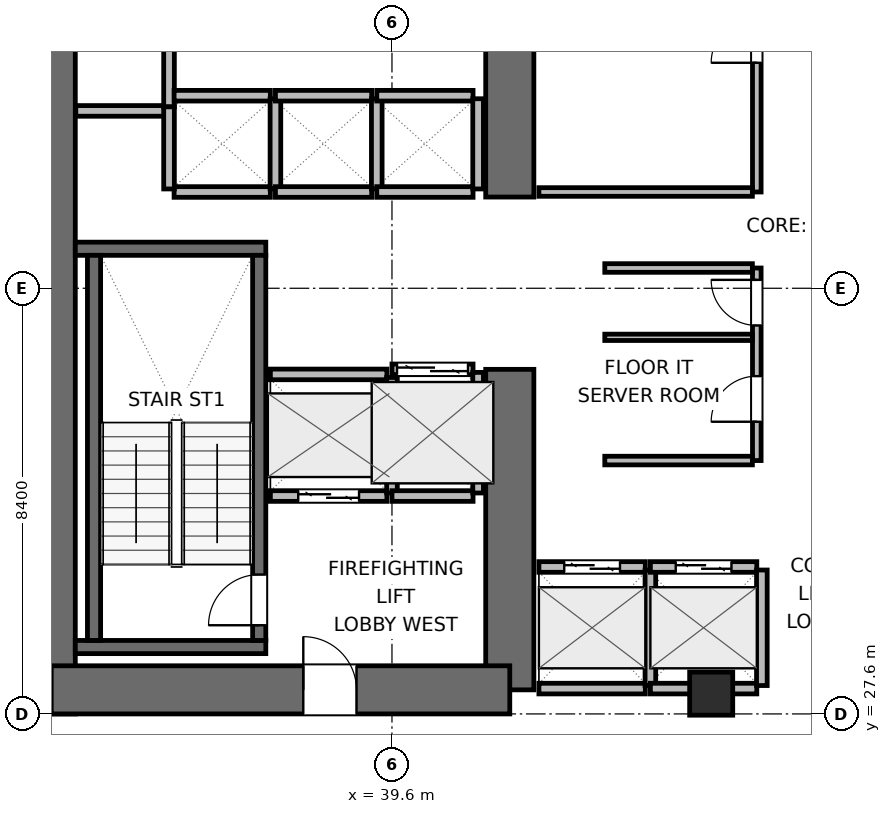
"""IFC4 building model, lengths in metres.
Left out: names, types, materials, properties, quantities, classifications, styles, units other than length and angle.
Written with IfcOpenShell. Run it as: python <this file> out.ifc"""

import sys

from ifc_helpers import new_model, si_unit, direction, frame, frame_2d, origin, origin_2d, place, context, subcontext, project, spatial, rectangle, extrude, element, fill, save


model = new_model("IFC4")
c1 = context("Model", 3, precision=1e-05, world=origin(), true_north=direction((0.0, 1.0)))
c2 = subcontext(c1, "Body", "Model", "MODEL_VIEW")
j1 = project(units=[si_unit("LENGTHUNIT", "METRE"), si_unit("PLANEANGLEUNIT", "RADIAN")], contexts=[c1])
p1 = place(None, origin())
s1 = spatial("IfcSite", under=j1, at=p1, CompositionType="ELEMENT")
p2 = place(p1, origin())
s2 = spatial("IfcBuilding", under=s1, at=p2, CompositionType="ELEMENT")
p3 = place(p2, frame((0.0, 0.0, 76.8)))
s3 = spatial("IfcBuildingStorey", under=s2, at=p3, CompositionType="ELEMENT", Elevation=76.8)
p4 = place(p3, frame((32.875, 27.6, 0.0), z_axis=(0.0, 0.0, 1.0), x_axis=(0.0, 1.0, 0.0)))
e1 = element("IfcWall", 1, at=p4, inside=s3, PredefinedType="SHEAR", context=c2, shape_type="SweptSolid", body=[
    extrude(rectangle(XDim=16.8, YDim=0.95, at=frame_2d((8.4, 0.0))), origin(), (0.0, 0.0, 1.0), 3.9),
])
p5 = place(p3, frame((41.925, 28.075, 0.0), z_axis=(0.0, 0.0, 1.0), x_axis=(0.0, 1.0, 0.0)))
e2 = element("IfcWall", 2, at=p5, inside=s3, PredefinedType="SHEAR", context=c2, shape_type="SweptSolid", body=[
    extrude(rectangle(XDim=6.325, YDim=0.95, at=frame_2d((3.163, 0.0))), origin(), (0.0, 0.0, 1.0), 3.9),
])
p6 = place(p3, frame((41.925, 37.8, 0.0), z_axis=(0.0, 0.0, 1.0), x_axis=(0.0, 1.0, 0.0)))
e3 = element("IfcWall", 3, at=p6, inside=s3, PredefinedType="SHEAR", context=c2, shape_type="SweptSolid", body=[
    extrude(rectangle(XDim=6.125, YDim=0.95, at=frame_2d((3.062, 0.0))), origin(), (0.0, 0.0, 1.0), 3.9),
])
p7 = place(p3, frame((32.875, 28.075, 0.0), z_axis=(0.0, 0.0, 1.0), x_axis=(1.0, 0.0, 0.0)))
e4 = element("IfcWall", 4, at=p7, inside=s3, PredefinedType="SHEAR", context=c2, shape_type="SweptSolid", body=[
    extrude(rectangle(XDim=9.05, YDim=0.95, at=frame_2d((4.525, 0.0))), origin(), (0.0, 0.0, 1.0), 3.9),
])
p8 = place(p7, frame((4.975, 0.0, 0.0)))
e5 = element("IfcOpeningElement", 5, at=p8, cuts=e4, PredefinedType="OPENING", context=c2, shape_type="SweptSolid", body=[
    extrude(rectangle(XDim=1.05, YDim=2.04, at=frame_2d((0.525, 1.02))), frame((0.0, 0.485, 0.0), z_axis=(0.0, -1.0, 0.0), x_axis=(1.0, 0.0, 0.0)), (0.0, 0.0, 1.0), 0.97),
])
for number, where, z_axis, x_axis in (
    (6, (33.35, 28.92, 0.0), (0.0, 0.0, 1.0), (1.0, 0.0, 0.0)),
    (7, (33.35, 36.78, 0.0), (0.0, 0.0, 1.0), (1.0, 0.0, 0.0)),
):
    element("IfcWall", number, at=place(p3, frame(where, z_axis=z_axis, x_axis=x_axis)), inside=s3, PredefinedType="SHEAR", context=c2, shape_type="SweptSolid", body=[
        extrude(rectangle(XDim=3.76, YDim=0.26, at=frame_2d((1.88, 0.0))), origin(), (0.0, 0.0, 1.0), 3.9),
    ])
p9 = place(p3, frame((33.72, 29.05, 0.0), z_axis=(0.0, 0.0, 1.0), x_axis=(0.0, 1.0, 0.0)))
e8 = element("IfcWall", 8, at=p9, inside=s3, PredefinedType="SHEAR", context=c2, shape_type="SweptSolid", body=[
    extrude(rectangle(XDim=7.6, YDim=0.26, at=frame_2d((3.8, 0.0))), origin(), (0.0, 0.0, 1.0), 3.9),
])
p10 = place(p3, frame((36.98, 29.05, 0.0), z_axis=(0.0, 0.0, 1.0), x_axis=(0.0, 1.0, 0.0)))
e9 = element("IfcWall", 9, at=p10, inside=s3, PredefinedType="SHEAR", context=c2, shape_type="SweptSolid", body=[
    extrude(rectangle(XDim=7.6, YDim=0.26, at=frame_2d((3.8, 0.0))), origin(), (0.0, 0.0, 1.0), 3.9),
])
p11 = place(p10, frame((0.3, 0.0, 0.0)))
e10 = element("IfcOpeningElement", 10, at=p11, cuts=e9, PredefinedType="OPENING", context=c2, shape_type="SweptSolid", body=[
    extrude(rectangle(XDim=1.0, YDim=2.04, at=frame_2d((0.5, 1.02))), frame((0.0, 0.14, 0.0), z_axis=(0.0, -1.0, 0.0), x_axis=(1.0, 0.0, 0.0)), (0.0, 0.0, 1.0), 0.28),
])
p12 = place(p3, frame((45.9, 28.0, 0.0), z_axis=(0.0, 0.0, 1.0), x_axis=(1.0, 0.0, 0.0)))
e11 = element("IfcColumn", 11, at=p12, inside=s3, PredefinedType="COLUMN", context=c2, shape_type="SweptSolid", body=[
    extrude(rectangle(XDim=0.85, YDim=0.85, at=origin_2d()), origin(), (0.0, 0.0, 1.0), 3.9),
])
p13 = place(p3, frame((33.36, 39.5, 0.0), z_axis=(0.0, 0.0, 1.0), x_axis=(1.0, 0.0, 0.0)))
e12 = element("IfcWall", 12, at=p13, inside=s3, PredefinedType="PARTITIONING", context=c2, shape_type="SweptSolid", body=[
    extrude(rectangle(XDim=1.86, YDim=0.21, at=frame_2d((0.93, 0.0))), origin(), (0.0, 0.0, 1.0), 3.6),
])
p14 = place(p3, frame((35.2, 39.58, 0.0), z_axis=(0.0, 0.0, 1.0), x_axis=(0.0, 1.0, 0.0)))
e13 = element("IfcWall", 13, at=p14, inside=s3, PredefinedType="PARTITIONING", context=c2, shape_type="SweptSolid", body=[
    extrude(rectangle(XDim=1.32, YDim=0.21, at=frame_2d((0.66, 0.0))), origin(), (0.0, 0.0, 1.0), 3.6),
])
p15 = place(p3, frame((37.2, 31.9, 0.0), z_axis=(0.0, 0.0, 1.0), x_axis=(1.0, 0.0, 0.0)))
e14 = element("IfcWall", 14, at=p15, inside=s3, PredefinedType="PARTITIONING", context=c2, shape_type="SweptSolid", body=[
    extrude(rectangle(XDim=2.3, YDim=0.21, at=frame_2d((1.15, 0.0))), origin(), (0.0, 0.0, 1.0), 3.6),
])
p16 = place(p15, frame((0.55, 0.0, 0.0)))
e15 = element("IfcOpeningElement", 15, at=p16, cuts=e14, PredefinedType="OPENING", context=c2, shape_type="SweptSolid", body=[
    extrude(rectangle(XDim=1.2, YDim=2.04, at=frame_2d((0.6, 1.02))), frame((0.0, 0.115, 0.0), z_axis=(0.0, -1.0, 0.0), x_axis=(1.0, 0.0, 0.0)), (0.0, 0.0, 1.0), 0.23),
])
p17 = place(p3, frame((37.2, 34.3, 0.0), z_axis=(0.0, 0.0, 1.0), x_axis=(1.0, 0.0, 0.0)))
e16 = element("IfcWall", 16, at=p17, inside=s3, PredefinedType="PARTITIONING", context=c2, shape_type="SweptSolid", body=[
    extrude(rectangle(XDim=2.3, YDim=0.21, at=frame_2d((1.15, 0.0))), origin(), (0.0, 0.0, 1.0), 3.6),
])
p18 = place(p3, frame((39.6, 31.96, 0.0), z_axis=(0.0, 0.0, 1.0), x_axis=(0.0, 1.0, 0.0)))
e17 = element("IfcWall", 17, at=p18, inside=s3, PredefinedType="PARTITIONING", context=c2, shape_type="SweptSolid", body=[
    extrude(rectangle(XDim=2.28, YDim=0.21, at=frame_2d((1.14, 0.0))), origin(), (0.0, 0.0, 1.0), 3.6),
])
p19 = place(p3, frame((39.6, 34.4, 0.0), z_axis=(0.0, 0.0, 1.0), x_axis=(1.0, 0.0, 0.0)))
e18 = element("IfcWall", 18, at=p19, inside=s3, PredefinedType="PARTITIONING", context=c2, shape_type="SweptSolid", body=[
    extrude(rectangle(XDim=1.6, YDim=0.21, at=frame_2d((0.8, 0.0))), origin(), (0.0, 0.0, 1.0), 3.6),
])
p20 = place(p19, frame((0.1, 0.0, 0.0)))
e19 = element("IfcOpeningElement", 19, at=p20, cuts=e18, PredefinedType="OPENING", context=c2, shape_type="SweptSolid", body=[
    extrude(rectangle(XDim=1.4, YDim=2.06, at=frame_2d((0.7, 1.03))), frame((0.0, 0.115, 0.0), z_axis=(0.0, -1.0, 0.0), x_axis=(1.0, 0.0, 0.0)), (0.0, 0.0, 1.0), 0.23),
])
p21 = place(p3, frame((39.6, 31.9, 0.0), z_axis=(0.0, 0.0, 1.0), x_axis=(1.0, 0.0, 0.0)))
e20 = element("IfcWall", 20, at=p21, inside=s3, PredefinedType="PARTITIONING", context=c2, shape_type="SweptSolid", body=[
    extrude(rectangle(XDim=1.6, YDim=0.21, at=frame_2d((0.8, 0.0))), origin(), (0.0, 0.0, 1.0), 3.6),
])
p22 = place(p3, frame((41.3, 31.96, 0.0), z_axis=(0.0, 0.0, 1.0), x_axis=(0.0, 1.0, 0.0)))
e21 = element("IfcWall", 21, at=p22, inside=s3, PredefinedType="PARTITIONING", context=c2, shape_type="SweptSolid", body=[
    extrude(rectangle(XDim=2.38, YDim=0.21, at=frame_2d((1.19, 0.0))), origin(), (0.0, 0.0, 1.0), 3.6),
])
p23 = place(p3, frame((42.5, 30.5, 0.0), z_axis=(0.0, 0.0, 1.0), x_axis=(1.0, 0.0, 0.0)))
e22 = element("IfcWall", 22, at=p23, inside=s3, PredefinedType="PARTITIONING", context=c2, shape_type="SweptSolid", body=[
    extrude(rectangle(XDim=2.1, YDim=0.21, at=frame_2d((1.05, 0.0))), origin(), (0.0, 0.0, 1.0), 3.6),
])
p24 = place(p23, frame((0.5, 0.0, 0.0)))
e23 = element("IfcOpeningElement", 23, at=p24, cuts=e22, PredefinedType="OPENING", context=c2, shape_type="SweptSolid", body=[
    extrude(rectangle(XDim=1.1, YDim=2.04, at=frame_2d((0.55, 1.02))), frame((0.0, 0.115, 0.0), z_axis=(0.0, -1.0, 0.0), x_axis=(1.0, 0.0, 0.0)), (0.0, 0.0, 1.0), 0.23),
])
p25 = place(p3, frame((42.5, 28.1, 0.0), z_axis=(0.0, 0.0, 1.0), x_axis=(1.0, 0.0, 0.0)))
e24 = element("IfcWall", 24, at=p25, inside=s3, PredefinedType="PARTITIONING", context=c2, shape_type="SweptSolid", body=[
    extrude(rectangle(XDim=2.1, YDim=0.21, at=frame_2d((1.05, 0.0))), origin(), (0.0, 0.0, 1.0), 2.485),
])
p26 = place(p3, frame((44.7, 28.16, 0.0), z_axis=(0.0, 0.0, 1.0), x_axis=(0.0, 1.0, 0.0)))
e25 = element("IfcWall", 25, at=p26, inside=s3, PredefinedType="PARTITIONING", context=c2, shape_type="SweptSolid", body=[
    extrude(rectangle(XDim=2.28, YDim=0.21, at=frame_2d((1.14, 0.0))), origin(), (0.0, 0.0, 1.0), 3.6),
])
p27 = place(p3, frame((44.7, 30.5, 0.0), z_axis=(0.0, 0.0, 1.0), x_axis=(1.0, 0.0, 0.0)))
e26 = element("IfcWall", 26, at=p27, inside=s3, PredefinedType="PARTITIONING", context=c2, shape_type="SweptSolid", body=[
    extrude(rectangle(XDim=2.1, YDim=0.21, at=frame_2d((1.05, 0.0))), origin(), (0.0, 0.0, 1.0), 3.6),
])
p28 = place(p27, frame((0.5, 0.0, 0.0)))
e27 = element("IfcOpeningElement", 27, at=p28, cuts=e26, PredefinedType="OPENING", context=c2, shape_type="SweptSolid", body=[
    extrude(rectangle(XDim=1.1, YDim=2.04, at=frame_2d((0.55, 1.02))), frame((0.0, 0.115, 0.0), z_axis=(0.0, -1.0, 0.0), x_axis=(1.0, 0.0, 0.0)), (0.0, 0.0, 1.0), 0.23),
])
p29 = place(p3, frame((44.7, 28.1, 0.0), z_axis=(0.0, 0.0, 1.0), x_axis=(1.0, 0.0, 0.0)))
e28 = element("IfcWall", 28, at=p29, inside=s3, PredefinedType="PARTITIONING", context=c2, shape_type="SweptSolid", body=[
    extrude(rectangle(XDim=2.1, YDim=0.21, at=frame_2d((1.05, 0.0))), origin(), (0.0, 0.0, 1.0), 2.485),
])
p30 = place(p3, frame((46.9, 28.16, 0.0), z_axis=(0.0, 0.0, 1.0), x_axis=(0.0, 1.0, 0.0)))
e29 = element("IfcWall", 29, at=p30, inside=s3, PredefinedType="PARTITIONING", context=c2, shape_type="SweptSolid", body=[
    extrude(rectangle(XDim=2.28, YDim=0.21, at=frame_2d((1.14, 0.0))), origin(), (0.0, 0.0, 1.0), 3.6),
])
for number, where, z_axis, x_axis in (
    (30, (35.3, 37.9, 0.0), (0.0, 0.0, 1.0), (1.0, 0.0, 0.0)),
    (31, (35.3, 39.8, 0.0), (0.0, 0.0, 1.0), (1.0, 0.0, 0.0)),
):
    element("IfcWall", number, at=place(p3, frame(where, z_axis=z_axis, x_axis=x_axis)), inside=s3, PredefinedType="PARTITIONING", context=c2, shape_type="SweptSolid", body=[
        extrude(rectangle(XDim=1.9, YDim=0.21, at=frame_2d((0.95, 0.0))), origin(), (0.0, 0.0, 1.0), 3.6),
    ])
p31 = place(p3, frame((35.2, 37.96, 0.0), z_axis=(0.0, 0.0, 1.0), x_axis=(0.0, 1.0, 0.0)))
e32 = element("IfcWall", 32, at=p31, inside=s3, PredefinedType="PARTITIONING", context=c2, shape_type="SweptSolid", body=[
    extrude(rectangle(XDim=1.62, YDim=0.21, at=frame_2d((0.81, 0.0))), origin(), (0.0, 0.0, 1.0), 3.6),
])
p32 = place(p3, frame((37.3, 37.96, 0.0), z_axis=(0.0, 0.0, 1.0), x_axis=(0.0, 1.0, 0.0)))
e33 = element("IfcWall", 33, at=p32, inside=s3, PredefinedType="PARTITIONING", context=c2, shape_type="SweptSolid", body=[
    extrude(rectangle(XDim=1.78, YDim=0.21, at=frame_2d((0.89, 0.0))), origin(), (0.0, 0.0, 1.0), 3.6),
])
for number, where, z_axis, x_axis in (
    (34, (37.3, 37.9, 0.0), (0.0, 0.0, 1.0), (1.0, 0.0, 0.0)),
    (35, (37.3, 39.8, 0.0), (0.0, 0.0, 1.0), (1.0, 0.0, 0.0)),
):
    element("IfcWall", number, at=place(p3, frame(where, z_axis=z_axis, x_axis=x_axis)), inside=s3, PredefinedType="PARTITIONING", context=c2, shape_type="SweptSolid", body=[
        extrude(rectangle(XDim=1.9, YDim=0.21, at=frame_2d((0.95, 0.0))), origin(), (0.0, 0.0, 1.0), 3.6),
    ])
p33 = place(p3, frame((39.3, 37.96, 0.0), z_axis=(0.0, 0.0, 1.0), x_axis=(0.0, 1.0, 0.0)))
e36 = element("IfcWall", 36, at=p33, inside=s3, PredefinedType="PARTITIONING", context=c2, shape_type="SweptSolid", body=[
    extrude(rectangle(XDim=1.78, YDim=0.21, at=frame_2d((0.89, 0.0))), origin(), (0.0, 0.0, 1.0), 3.6),
])
for number, where, z_axis, x_axis in (
    (37, (39.3, 37.9, 0.0), (0.0, 0.0, 1.0), (1.0, 0.0, 0.0)),
    (38, (39.3, 39.8, 0.0), (0.0, 0.0, 1.0), (1.0, 0.0, 0.0)),
):
    element("IfcWall", number, at=place(p3, frame(where, z_axis=z_axis, x_axis=x_axis)), inside=s3, PredefinedType="PARTITIONING", context=c2, shape_type="SweptSolid", body=[
        extrude(rectangle(XDim=1.9, YDim=0.21, at=frame_2d((0.95, 0.0))), origin(), (0.0, 0.0, 1.0), 3.6),
    ])
p34 = place(p3, frame((41.3, 37.96, 0.0), z_axis=(0.0, 0.0, 1.0), x_axis=(0.0, 1.0, 0.0)))
e39 = element("IfcWall", 39, at=p34, inside=s3, PredefinedType="PARTITIONING", context=c2, shape_type="SweptSolid", body=[
    extrude(rectangle(XDim=1.78, YDim=0.21, at=frame_2d((0.89, 0.0))), origin(), (0.0, 0.0, 1.0), 3.6),
])
p35 = place(p3, frame((46.8, 32.6, 0.0), z_axis=(0.0, 0.0, 1.0), x_axis=(0.0, 1.0, 0.0)))
e40 = element("IfcWall", 40, at=p35, inside=s3, PredefinedType="PARTITIONING", context=c2, shape_type="SweptSolid", body=[
    extrude(rectangle(XDim=3.8, YDim=0.17, at=frame_2d((1.9, 0.0))), origin(), (0.0, 0.0, 1.0), 3.6),
])
p36 = place(p35, frame((0.766, 0.0, 0.0)))
e41 = element("IfcOpeningElement", 41, at=p36, cuts=e40, PredefinedType="OPENING", context=c2, shape_type="SweptSolid", body=[
    extrude(rectangle(XDim=0.9, YDim=2.02, at=frame_2d((0.45, 1.01))), frame((0.0, 0.095, 0.0), z_axis=(0.0, -1.0, 0.0), x_axis=(1.0, 0.0, 0.0)), (0.0, 0.0, 1.0), 0.19),
])
p37 = place(p35, frame((2.666, 0.0, 0.0)))
e42 = element("IfcOpeningElement", 42, at=p37, cuts=e40, PredefinedType="OPENING", context=c2, shape_type="SweptSolid", body=[
    extrude(rectangle(XDim=0.9, YDim=2.02, at=frame_2d((0.45, 1.01))), frame((0.0, 0.095, 0.0), z_axis=(0.0, -1.0, 0.0), x_axis=(1.0, 0.0, 0.0)), (0.0, 0.0, 1.0), 0.19),
])
for number, where, z_axis, x_axis in (
    (43, (43.8, 32.6, 0.0), (0.0, 0.0, 1.0), (1.0, 0.0, 0.0)),
    (44, (43.8, 36.4, 0.0), (0.0, 0.0, 1.0), (1.0, 0.0, 0.0)),
):
    element("IfcWall", number, at=place(p3, frame(where, z_axis=z_axis, x_axis=x_axis)), inside=s3, PredefinedType="PARTITIONING", context=c2, shape_type="SweptSolid", body=[
        extrude(rectangle(XDim=2.913, YDim=0.17, at=frame_2d((1.457, 0.0))), origin(), (0.0, 0.0, 1.0), 3.6),
    ])
p38 = place(p3, frame((43.8, 35.032, 0.0), z_axis=(0.0, 0.0, 1.0), x_axis=(1.0, 0.0, 0.0)))
e45 = element("IfcWall", 45, at=p38, inside=s3, PredefinedType="PARTITIONING", context=c2, shape_type="SweptSolid", body=[
    extrude(rectangle(XDim=2.913, YDim=0.125, at=frame_2d((1.457, 0.0))), origin(), (0.0, 0.0, 1.0), 3.6),
])
p39 = place(p3, frame((46.8, 37.9, 0.0), z_axis=(0.0, 0.0, 1.0), x_axis=(0.0, 1.0, 0.0)))
e46 = element("IfcWall", 46, at=p39, inside=s3, PredefinedType="PARTITIONING", context=c2, shape_type="SweptSolid", body=[
    extrude(rectangle(XDim=6.0, YDim=0.17, at=frame_2d((3.0, 0.0))), origin(), (0.0, 0.0, 1.0), 3.6),
])
p40 = place(p39, frame((2.55, 0.0, 0.0)))
e47 = element("IfcOpeningElement", 47, at=p40, cuts=e46, PredefinedType="OPENING", context=c2, shape_type="SweptSolid", body=[
    extrude(rectangle(XDim=0.9, YDim=2.02, at=frame_2d((0.45, 1.01))), frame((0.0, 0.095, 0.0), z_axis=(0.0, -1.0, 0.0), x_axis=(1.0, 0.0, 0.0)), (0.0, 0.0, 1.0), 0.19),
])
p41 = place(p3, frame((42.5, 37.9, 0.0), z_axis=(0.0, 0.0, 1.0), x_axis=(1.0, 0.0, 0.0)))
e48 = element("IfcWall", 48, at=p41, inside=s3, PredefinedType="PARTITIONING", context=c2, shape_type="SweptSolid", body=[
    extrude(rectangle(XDim=4.213, YDim=0.17, at=frame_2d((2.106, 0.0))), origin(), (0.0, 0.0, 1.0), 3.6),
])
p42 = place(p11, origin())
e49 = element("IfcDoor", 49, at=p42, inside=s3, OperationType="SINGLE_SWING_LEFT", PredefinedType="DOOR", context=c2, shape_type="SweptSolid", body=[
    extrude(rectangle(XDim=1.0, YDim=2.04, at=frame_2d((0.5, 1.02))), frame((0.0, 0.025, 0.0), z_axis=(0.0, -1.0, 0.0), x_axis=(1.0, 0.0, 0.0)), (0.0, 0.0, 1.0), 0.05),
])
fill(e10, e49)
p43 = place(p16, origin())
e50 = element("IfcDoor", 50, at=p43, inside=s3, OperationType="DOUBLE_DOOR_SLIDING", PredefinedType="DOOR", context=c2, shape_type="SweptSolid", body=[
    extrude(rectangle(XDim=1.2, YDim=2.04, at=frame_2d((0.6, 1.02))), frame((0.0, 0.025, 0.0), z_axis=(0.0, -1.0, 0.0), x_axis=(1.0, 0.0, 0.0)), (0.0, 0.0, 1.0), 0.05),
])
fill(e15, e50)
p44 = place(p20, origin())
e51 = element("IfcDoor", 51, at=p44, inside=s3, OperationType="DOUBLE_DOOR_SLIDING", PredefinedType="DOOR", context=c2, shape_type="SweptSolid", body=[
    extrude(rectangle(XDim=1.4, YDim=2.06, at=frame_2d((0.7, 1.03))), frame((0.0, 0.025, 0.0), z_axis=(0.0, -1.0, 0.0), x_axis=(1.0, 0.0, 0.0)), (0.0, 0.0, 1.0), 0.05),
])
fill(e19, e51)
p45 = place(p24, origin())
e52 = element("IfcDoor", 52, at=p45, inside=s3, OperationType="DOUBLE_DOOR_SLIDING", PredefinedType="DOOR", context=c2, shape_type="SweptSolid", body=[
    extrude(rectangle(XDim=1.1, YDim=2.04, at=frame_2d((0.55, 1.02))), frame((0.0, 0.025, 0.0), z_axis=(0.0, -1.0, 0.0), x_axis=(1.0, 0.0, 0.0)), (0.0, 0.0, 1.0), 0.05),
])
fill(e23, e52)
p46 = place(p28, origin())
e53 = element("IfcDoor", 53, at=p46, inside=s3, OperationType="DOUBLE_DOOR_SLIDING", PredefinedType="DOOR", context=c2, shape_type="SweptSolid", body=[
    extrude(rectangle(XDim=1.1, YDim=2.04, at=frame_2d((0.55, 1.02))), frame((0.0, 0.025, 0.0), z_axis=(0.0, -1.0, 0.0), x_axis=(1.0, 0.0, 0.0)), (0.0, 0.0, 1.0), 0.05),
])
fill(e27, e53)
p47 = place(p8, origin())
e54 = element("IfcDoor", 54, at=p47, inside=s3, OperationType="SINGLE_SWING_LEFT", PredefinedType="DOOR", context=c2, shape_type="SweptSolid", body=[
    extrude(rectangle(XDim=1.05, YDim=2.04, at=frame_2d((0.525, 1.02))), frame((0.0, 0.025, 0.0), z_axis=(0.0, -1.0, 0.0), x_axis=(1.0, 0.0, 0.0)), (0.0, 0.0, 1.0), 0.05),
])
fill(e5, e54)
p48 = place(p36, origin())
e55 = element("IfcDoor", 55, at=p48, inside=s3, OperationType="SINGLE_SWING_LEFT", PredefinedType="DOOR", context=c2, shape_type="SweptSolid", body=[
    extrude(rectangle(XDim=0.9, YDim=2.02, at=frame_2d((0.45, 1.01))), frame((0.0, 0.025, 0.0), z_axis=(0.0, -1.0, 0.0), x_axis=(1.0, 0.0, 0.0)), (0.0, 0.0, 1.0), 0.05),
])
fill(e41, e55)
p49 = place(p37, origin())
e56 = element("IfcDoor", 56, at=p49, inside=s3, OperationType="SINGLE_SWING_RIGHT", PredefinedType="DOOR", context=c2, shape_type="SweptSolid", body=[
    extrude(rectangle(XDim=0.9, YDim=2.02, at=frame_2d((0.45, 1.01))), frame((0.0, 0.025, 0.0), z_axis=(0.0, -1.0, 0.0), x_axis=(1.0, 0.0, 0.0)), (0.0, 0.0, 1.0), 0.05),
])
fill(e42, e56)
p50 = place(p40, origin())
e57 = element("IfcDoor", 57, at=p50, inside=s3, OperationType="SINGLE_SWING_LEFT", PredefinedType="DOOR", context=c2, shape_type="SweptSolid", body=[
    extrude(rectangle(XDim=0.9, YDim=2.02, at=frame_2d((0.45, 1.01))), frame((0.0, 0.025, 0.0), z_axis=(0.0, -1.0, 0.0), x_axis=(1.0, 0.0, 0.0)), (0.0, 0.0, 1.0), 0.05),
])
fill(e47, e57)
save(model, sys.argv[1])
